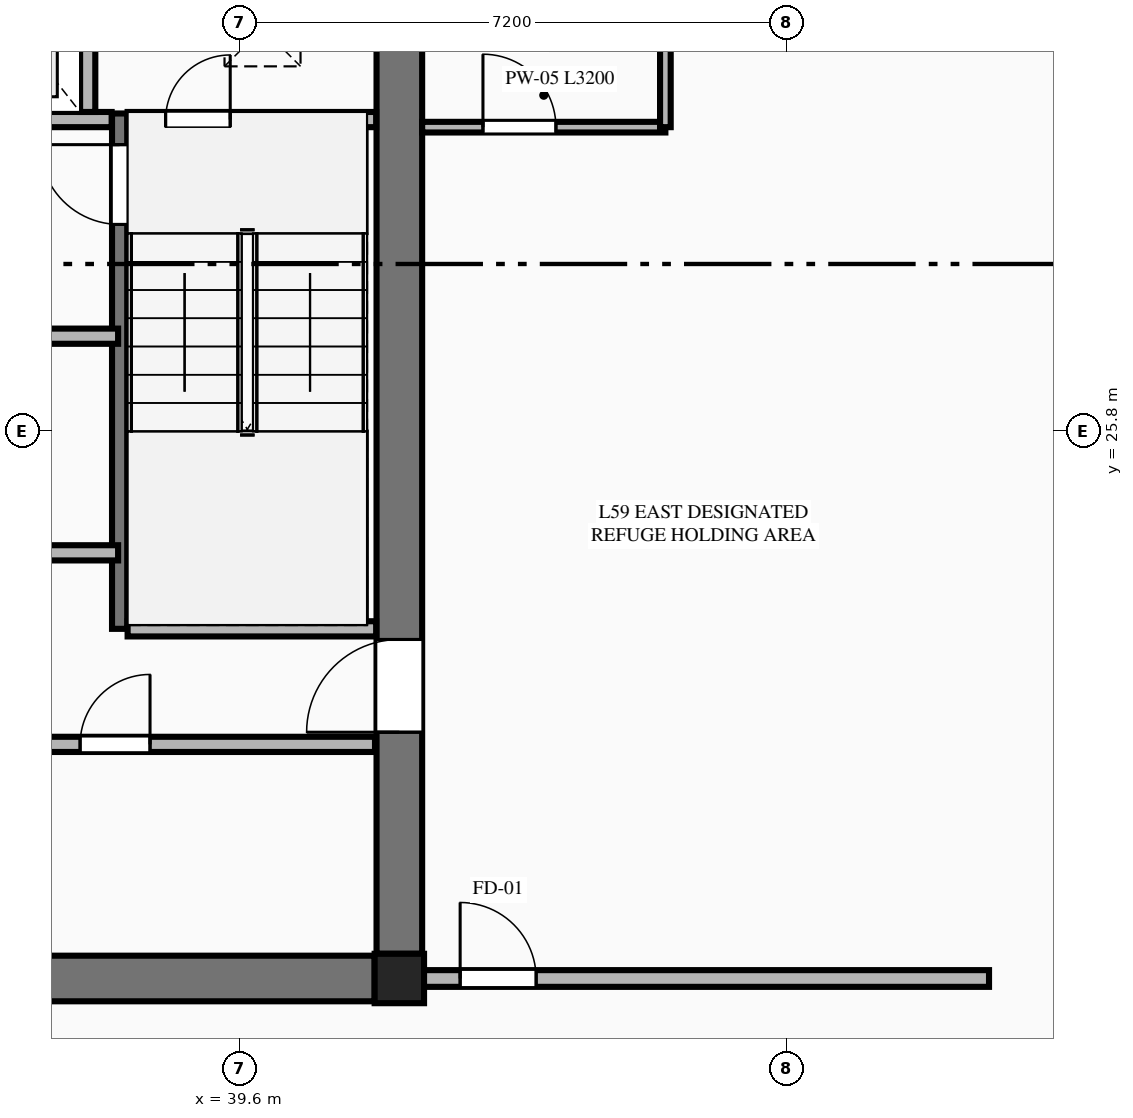
"""IFC4 building model, lengths in metres.
Left out: names, types, materials, properties, quantities, classifications, styles, units other than length and angle.
Written with IfcOpenShell. Run it as: python <this file> out.ifc"""

import sys

from ifc_helpers import new_model, si_unit, direction, frame, frame_2d, origin, origin_2d, place, context, subcontext, project, spatial, rectangle, extrude, element, fill, save


model = new_model("IFC4")
c1 = context("Model", 3, precision=1e-05, world=origin(), true_north=direction((0.0, 1.0)))
c2 = subcontext(c1, "Body", "Model", "MODEL_VIEW")
j1 = project(units=[si_unit("LENGTHUNIT", "METRE"), si_unit("PLANEANGLEUNIT", "RADIAN")], contexts=[c1])
p1 = place(None, origin())
s1 = spatial("IfcSite", under=j1, at=p1, CompositionType="ELEMENT")
p2 = place(p1, origin())
s2 = spatial("IfcBuilding", under=s1, at=p2, CompositionType="ELEMENT")
p3 = place(p2, frame((0.0, 0.0, 221.6)))
s3 = spatial("IfcBuildingStorey", under=s2, at=p3, CompositionType="ELEMENT", Elevation=221.6)
p4 = place(p3, frame((41.7, 18.6, 0.0), z_axis=(0.0, 0.0, 1.0), x_axis=(1.0, 0.0, 0.0)))
e1 = element("IfcColumn", 1, at=p4, inside=s3, PredefinedType="COLUMN", context=c2, shape_type="SweptSolid", body=[
    extrude(rectangle(XDim=0.65, YDim=0.65, at=origin_2d()), origin(), (0.0, 0.0, 1.0), 5.4),
])
p5 = place(p3, frame((23.425, 18.6, 0.0), z_axis=(0.0, 0.0, 1.0), x_axis=(1.0, 0.0, 0.0)))
e2 = element("IfcWall", 2, at=p5, inside=s3, PredefinedType="SHEAR", context=c2, shape_type="SweptSolid", body=[
    extrude(rectangle(XDim=17.95, YDim=0.6, at=frame_2d((8.975, 0.0))), origin(), (0.0, 0.0, 1.0), 5.2),
])
p6 = place(p3, frame((41.7, 18.925, 0.0), z_axis=(0.0, 0.0, 1.0), x_axis=(0.0, 1.0, 0.0)))
e3 = element("IfcWall", 3, at=p6, inside=s3, PredefinedType="SHEAR", context=c2, shape_type="SweptSolid", body=[
    extrude(rectangle(XDim=13.95, YDim=0.6, at=frame_2d((6.975, 0.0))), origin(), (0.0, 0.0, 1.0), 5.2),
])
p7 = place(p6, frame((2.915, 0.0, 0.0)))
e4 = element("IfcOpeningElement", 4, at=p7, cuts=e3, PredefinedType="OPENING", context=c2, shape_type="SweptSolid", body=[
    extrude(rectangle(XDim=1.22, YDim=2.25, at=frame_2d((0.61, 1.125))), frame((0.0, 0.31, 0.0), z_axis=(0.0, -1.0, 0.0), x_axis=(1.0, 0.0, 0.0)), (0.0, 0.0, 1.0), 0.62),
])
p8 = place(p3, frame((38.02, 23.2, 0.0), z_axis=(0.0, 0.0, 1.0), x_axis=(0.0, 1.0, 0.0)))
e5 = element("IfcWall", 5, at=p8, inside=s3, PredefinedType="SHEAR", context=c2, shape_type="SweptSolid", body=[
    extrude(rectangle(XDim=6.78, YDim=0.2, at=frame_2d((3.39, 0.0))), origin(), (0.0, 0.0, 1.0), 5.4),
])
p9 = place(p8, frame((5.32, 0.0, 0.0)))
e6 = element("IfcOpeningElement", 6, at=p9, cuts=e5, PredefinedType="OPENING", context=c2, shape_type="SweptSolid", body=[
    extrude(rectangle(XDim=1.05, YDim=2.15, at=frame_2d((0.525, 1.075))), frame((0.0, 0.11, 0.0), z_axis=(0.0, -1.0, 0.0), x_axis=(1.0, 0.0, 0.0)), (0.0, 0.0, 1.0), 0.22),
])
p10 = place(p3, frame((38.125, 23.2, 0.0), z_axis=(0.0, 0.0, 1.0), x_axis=(1.0, 0.0, 0.0)))
e7 = element("IfcWall", 7, at=p10, inside=s3, PredefinedType="PLUMBINGWALL", context=c2, shape_type="SweptSolid", body=[
    extrude(rectangle(XDim=3.27, YDim=0.2, at=frame_2d((1.635, 0.0))), origin(), (0.0, 0.0, 1.0), 5.2),
])
p11 = place(p3, frame((34.9, 29.9, 0.0), z_axis=(0.0, 0.0, 1.0), x_axis=(1.0, 0.0, 0.0)))
e8 = element("IfcWall", 8, at=p11, inside=s3, PredefinedType="PLUMBINGWALL", context=c2, shape_type="SweptSolid", body=[
    extrude(rectangle(XDim=3.015, YDim=0.2, at=frame_2d((1.508, 0.0))), origin(), (0.0, 0.0, 1.0), 5.2),
])
p12 = place(p11, frame((0.725, 0.0, 0.0)))
e9 = element("IfcOpeningElement", 9, at=p12, cuts=e8, PredefinedType="OPENING", context=c2, shape_type="SweptSolid", body=[
    extrude(rectangle(XDim=1.15, YDim=2.2, at=frame_2d((0.575, 1.1))), frame((0.0, 0.11, 0.0), z_axis=(0.0, -1.0, 0.0), x_axis=(1.0, 0.0, 0.0)), (0.0, 0.0, 1.0), 0.22),
])
p13 = place(p3, frame((38.125, 29.9, 0.0), z_axis=(0.0, 0.0, 1.0), x_axis=(1.0, 0.0, 0.0)))
e10 = element("IfcWall", 10, at=p13, inside=s3, PredefinedType="PLUMBINGWALL", context=c2, shape_type="SweptSolid", body=[
    extrude(rectangle(XDim=3.27, YDim=0.2, at=frame_2d((1.635, 0.0))), origin(), (0.0, 0.0, 1.0), 5.2),
])
p14 = place(p13, frame((0.5, 0.0, 0.0)))
e11 = element("IfcOpeningElement", 11, at=p14, cuts=e10, PredefinedType="OPENING", context=c2, shape_type="SweptSolid", body=[
    extrude(rectangle(XDim=0.85, YDim=2.05, at=frame_2d((0.425, 1.025))), frame((0.0, 0.11, 0.0), z_axis=(0.0, -1.0, 0.0), x_axis=(1.0, 0.0, 0.0)), (0.0, 0.0, 1.0), 0.22),
])
p15 = place(p3, frame((37.6, 30.0, 0.0), z_axis=(0.0, 0.0, 1.0), x_axis=(0.0, 1.0, 0.0)))
e12 = element("IfcWall", 12, at=p15, inside=s3, PredefinedType="PLUMBINGWALL", context=c2, shape_type="SweptSolid", body=[
    extrude(rectangle(XDim=2.85, YDim=0.2, at=frame_2d((1.425, 0.0))), origin(), (0.0, 0.0, 1.0), 5.2),
])
p16 = place(p3, frame((34.8, 27.05, 0.0), z_axis=(0.0, 0.0, 1.0), x_axis=(1.0, 0.0, 0.0)))
e13 = element("IfcWall", 13, at=p16, inside=s3, PredefinedType="PLUMBINGWALL", context=c2, shape_type="SweptSolid", body=[
    extrude(rectangle(XDim=3.2, YDim=0.2, at=frame_2d((1.6, 0.0))), origin(), (0.0, 0.0, 1.0), 5.2),
])
p17 = place(p3, frame((31.2, 24.2, 0.0), z_axis=(0.0, 0.0, 1.0), x_axis=(1.0, 0.0, 0.0)))
e14 = element("IfcWall", 14, at=p17, inside=s3, PredefinedType="PLUMBINGWALL", context=c2, shape_type="SweptSolid", body=[
    extrude(rectangle(XDim=6.8, YDim=0.2, at=frame_2d((3.4, 0.0))), origin(), (0.0, 0.0, 1.0), 5.2),
])
p18 = place(p17, frame((0.65, 0.0, 0.0)))
e15 = element("IfcOpeningElement", 15, at=p18, cuts=e14, PredefinedType="OPENING", context=c2, shape_type="SweptSolid", body=[
    extrude(rectangle(XDim=1.1, YDim=2.2, at=frame_2d((0.55, 1.1))), frame((0.0, 0.11, 0.0), z_axis=(0.0, -1.0, 0.0), x_axis=(1.0, 0.0, 0.0)), (0.0, 0.0, 1.0), 0.22),
])
p19 = place(p17, frame((3.8, 0.0, 0.0)))
e16 = element("IfcOpeningElement", 16, at=p19, cuts=e14, PredefinedType="OPENING", context=c2, shape_type="SweptSolid", body=[
    extrude(rectangle(XDim=0.92, YDim=2.15, at=frame_2d((0.46, 1.075))), frame((0.0, 0.11, 0.0), z_axis=(0.0, -1.0, 0.0), x_axis=(1.0, 0.0, 0.0)), (0.0, 0.0, 1.0), 0.22),
])
p20 = place(p3, frame((23.42, 21.68, 0.0), z_axis=(0.0, 0.0, 1.0), x_axis=(1.0, 0.0, 0.0)))
e17 = element("IfcWall", 17, at=p20, inside=s3, PredefinedType="PLUMBINGWALL", context=c2, shape_type="SweptSolid", body=[
    extrude(rectangle(XDim=17.96, YDim=0.2, at=frame_2d((8.98, 0.0))), origin(), (0.0, 0.0, 1.0), 5.2),
])
p21 = place(p20, frame((0.46, 0.0, 0.0)))
e18 = element("IfcOpeningElement", 18, at=p21, cuts=e17, PredefinedType="OPENING", context=c2, shape_type="SweptSolid", body=[
    extrude(rectangle(XDim=0.92, YDim=2.15, at=frame_2d((0.46, 1.075))), frame((0.0, 0.11, 0.0), z_axis=(0.0, -1.0, 0.0), x_axis=(1.0, 0.0, 0.0)), (0.0, 0.0, 1.0), 0.22),
])
p22 = place(p20, frame((4.78, 0.0, 0.0)))
e19 = element("IfcOpeningElement", 19, at=p22, cuts=e17, PredefinedType="OPENING", context=c2, shape_type="SweptSolid", body=[
    extrude(rectangle(XDim=0.92, YDim=2.15, at=frame_2d((0.46, 1.075))), frame((0.0, 0.11, 0.0), z_axis=(0.0, -1.0, 0.0), x_axis=(1.0, 0.0, 0.0)), (0.0, 0.0, 1.0), 0.22),
])
p23 = place(p20, frame((9.48, 0.0, 0.0)))
e20 = element("IfcOpeningElement", 20, at=p23, cuts=e17, PredefinedType="OPENING", context=c2, shape_type="SweptSolid", body=[
    extrude(rectangle(XDim=0.92, YDim=2.15, at=frame_2d((0.46, 1.075))), frame((0.0, 0.11, 0.0), z_axis=(0.0, -1.0, 0.0), x_axis=(1.0, 0.0, 0.0)), (0.0, 0.0, 1.0), 0.22),
])
p24 = place(p20, frame((14.08, 0.0, 0.0)))
e21 = element("IfcOpeningElement", 21, at=p24, cuts=e17, PredefinedType="OPENING", context=c2, shape_type="SweptSolid", body=[
    extrude(rectangle(XDim=0.92, YDim=2.15, at=frame_2d((0.46, 1.075))), frame((0.0, 0.11, 0.0), z_axis=(0.0, -1.0, 0.0), x_axis=(1.0, 0.0, 0.0)), (0.0, 0.0, 1.0), 0.22),
])
p25 = place(p3, frame((42.0, 18.6, 0.0), z_axis=(0.0, 0.0, 1.0), x_axis=(1.0, 0.0, 0.0)))
e22 = element("IfcWall", 22, at=p25, inside=s3, PredefinedType="PARTITIONING", context=c2, shape_type="SweptSolid", body=[
    extrude(rectangle(XDim=7.458, YDim=0.22, at=frame_2d((3.729, 0.0))), origin(), (0.0, 0.0, 1.0), 3.79),
])
p26 = place(p25, frame((0.5, 0.0, 0.0)))
e23 = element("IfcOpeningElement", 23, at=p26, cuts=e22, PredefinedType="OPENING", context=c2, shape_type="SweptSolid", body=[
    extrude(rectangle(XDim=1.0, YDim=2.15, at=frame_2d((0.5, 1.075))), frame((0.0, 0.12, 0.0), z_axis=(0.0, -1.0, 0.0), x_axis=(1.0, 0.0, 0.0)), (0.0, 0.0, 1.0), 0.24),
])
p27 = place(p3, frame((42.0, 29.8, 0.0), z_axis=(0.0, 0.0, 1.0), x_axis=(1.0, 0.0, 0.0)))
e24 = element("IfcWall", 24, at=p27, inside=s3, PredefinedType="PLUMBINGWALL", context=c2, shape_type="SweptSolid", body=[
    extrude(rectangle(XDim=3.2, YDim=0.14, at=frame_2d((1.6, 0.0))), origin(), (0.0, 0.0, 1.0), 5.2),
])
p28 = place(p27, frame((0.8, 0.0, 0.0)))
e25 = element("IfcOpeningElement", 25, at=p28, cuts=e24, PredefinedType="OPENING", context=c2, shape_type="SweptSolid", body=[
    extrude(rectangle(XDim=0.96, YDim=2.15, at=frame_2d((0.48, 1.075))), frame((0.0, 0.08, 0.0), z_axis=(0.0, -1.0, 0.0), x_axis=(1.0, 0.0, 0.0)), (0.0, 0.0, 1.0), 0.16),
])
p29 = place(p3, frame((45.2, 29.8, 0.0), z_axis=(0.0, 0.0, 1.0), x_axis=(0.0, 1.0, 0.0)))
e26 = element("IfcWall", 26, at=p29, inside=s3, PredefinedType="PLUMBINGWALL", context=c2, shape_type="SweptSolid", body=[
    extrude(rectangle(XDim=3.4, YDim=0.14, at=frame_2d((1.7, 0.0))), origin(), (0.0, 0.0, 1.0), 5.2),
])
p30 = place(p3, frame((49.403, 13.427, 0.0), z_axis=(0.0, 0.0, 1.0), x_axis=(0.451276600056, 0.892384127067, 0.0)))
e27 = element("IfcWall", 27, at=p30, inside=s3, PredefinedType="STANDARD", context=c2, shape_type="SweptSolid", body=[
    extrude(rectangle(XDim=5.09, YDim=0.36, at=frame_2d((2.545, 0.0))), origin(), (0.0, 0.0, 1.0), 3.79),
])
p31 = place(p7, origin())
e28 = element("IfcDoor", 28, at=p31, inside=s3, OperationType="SINGLE_SWING_LEFT", PredefinedType="DOOR", context=c2, shape_type="SweptSolid", body=[
    extrude(rectangle(XDim=1.22, YDim=2.25, at=frame_2d((0.61, 1.125))), frame((0.0, 0.025, 0.0), z_axis=(0.0, -1.0, 0.0), x_axis=(1.0, 0.0, 0.0)), (0.0, 0.0, 1.0), 0.05),
])
fill(e4, e28)
p32 = place(p9, origin())
e29 = element("IfcDoor", 29, at=p32, inside=s3, OperationType="SINGLE_SWING_RIGHT", PredefinedType="DOOR", context=c2, shape_type="SweptSolid", body=[
    extrude(rectangle(XDim=1.05, YDim=2.15, at=frame_2d((0.525, 1.075))), frame((0.0, 0.025, 0.0), z_axis=(0.0, -1.0, 0.0), x_axis=(1.0, 0.0, 0.0)), (0.0, 0.0, 1.0), 0.05),
])
fill(e6, e29)
p33 = place(p14, origin())
e30 = element("IfcDoor", 30, at=p33, inside=s3, OperationType="SINGLE_SWING_RIGHT", PredefinedType="DOOR", context=c2, shape_type="SweptSolid", body=[
    extrude(rectangle(XDim=0.85, YDim=2.05, at=frame_2d((0.425, 1.025))), frame((0.0, 0.025, 0.0), z_axis=(0.0, -1.0, 0.0), x_axis=(1.0, 0.0, 0.0)), (0.0, 0.0, 1.0), 0.05),
])
fill(e11, e30)
p34 = place(p24, origin())
e31 = element("IfcDoor", 31, at=p34, inside=s3, OperationType="SINGLE_SWING_RIGHT", PredefinedType="DOOR", context=c2, shape_type="SweptSolid", body=[
    extrude(rectangle(XDim=0.92, YDim=2.15, at=frame_2d((0.46, 1.075))), frame((0.0, 0.025, 0.0), z_axis=(0.0, -1.0, 0.0), x_axis=(1.0, 0.0, 0.0)), (0.0, 0.0, 1.0), 0.05),
])
fill(e21, e31)
p35 = place(p28, origin())
e32 = element("IfcDoor", 32, at=p35, inside=s3, OperationType="SINGLE_SWING_LEFT", PredefinedType="DOOR", context=c2, shape_type="SweptSolid", body=[
    extrude(rectangle(XDim=0.96, YDim=2.15, at=frame_2d((0.48, 1.075))), frame((0.0, 0.025, 0.0), z_axis=(0.0, -1.0, 0.0), x_axis=(1.0, 0.0, 0.0)), (0.0, 0.0, 1.0), 0.05),
])
fill(e25, e32)
p36 = place(p26, origin())
e33 = element("IfcDoor", 33, at=p36, inside=s3, OperationType="SINGLE_SWING_LEFT", PredefinedType="DOOR", context=c2, shape_type="SweptSolid", body=[
    extrude(rectangle(XDim=1.0, YDim=2.15, at=frame_2d((0.5, 1.075))), frame((0.0, 0.025, 0.0), z_axis=(0.0, -1.0, 0.0), x_axis=(1.0, 0.0, 0.0)), (0.0, 0.0, 1.0), 0.05),
])
fill(e23, e33)
save(model, sys.argv[1])
